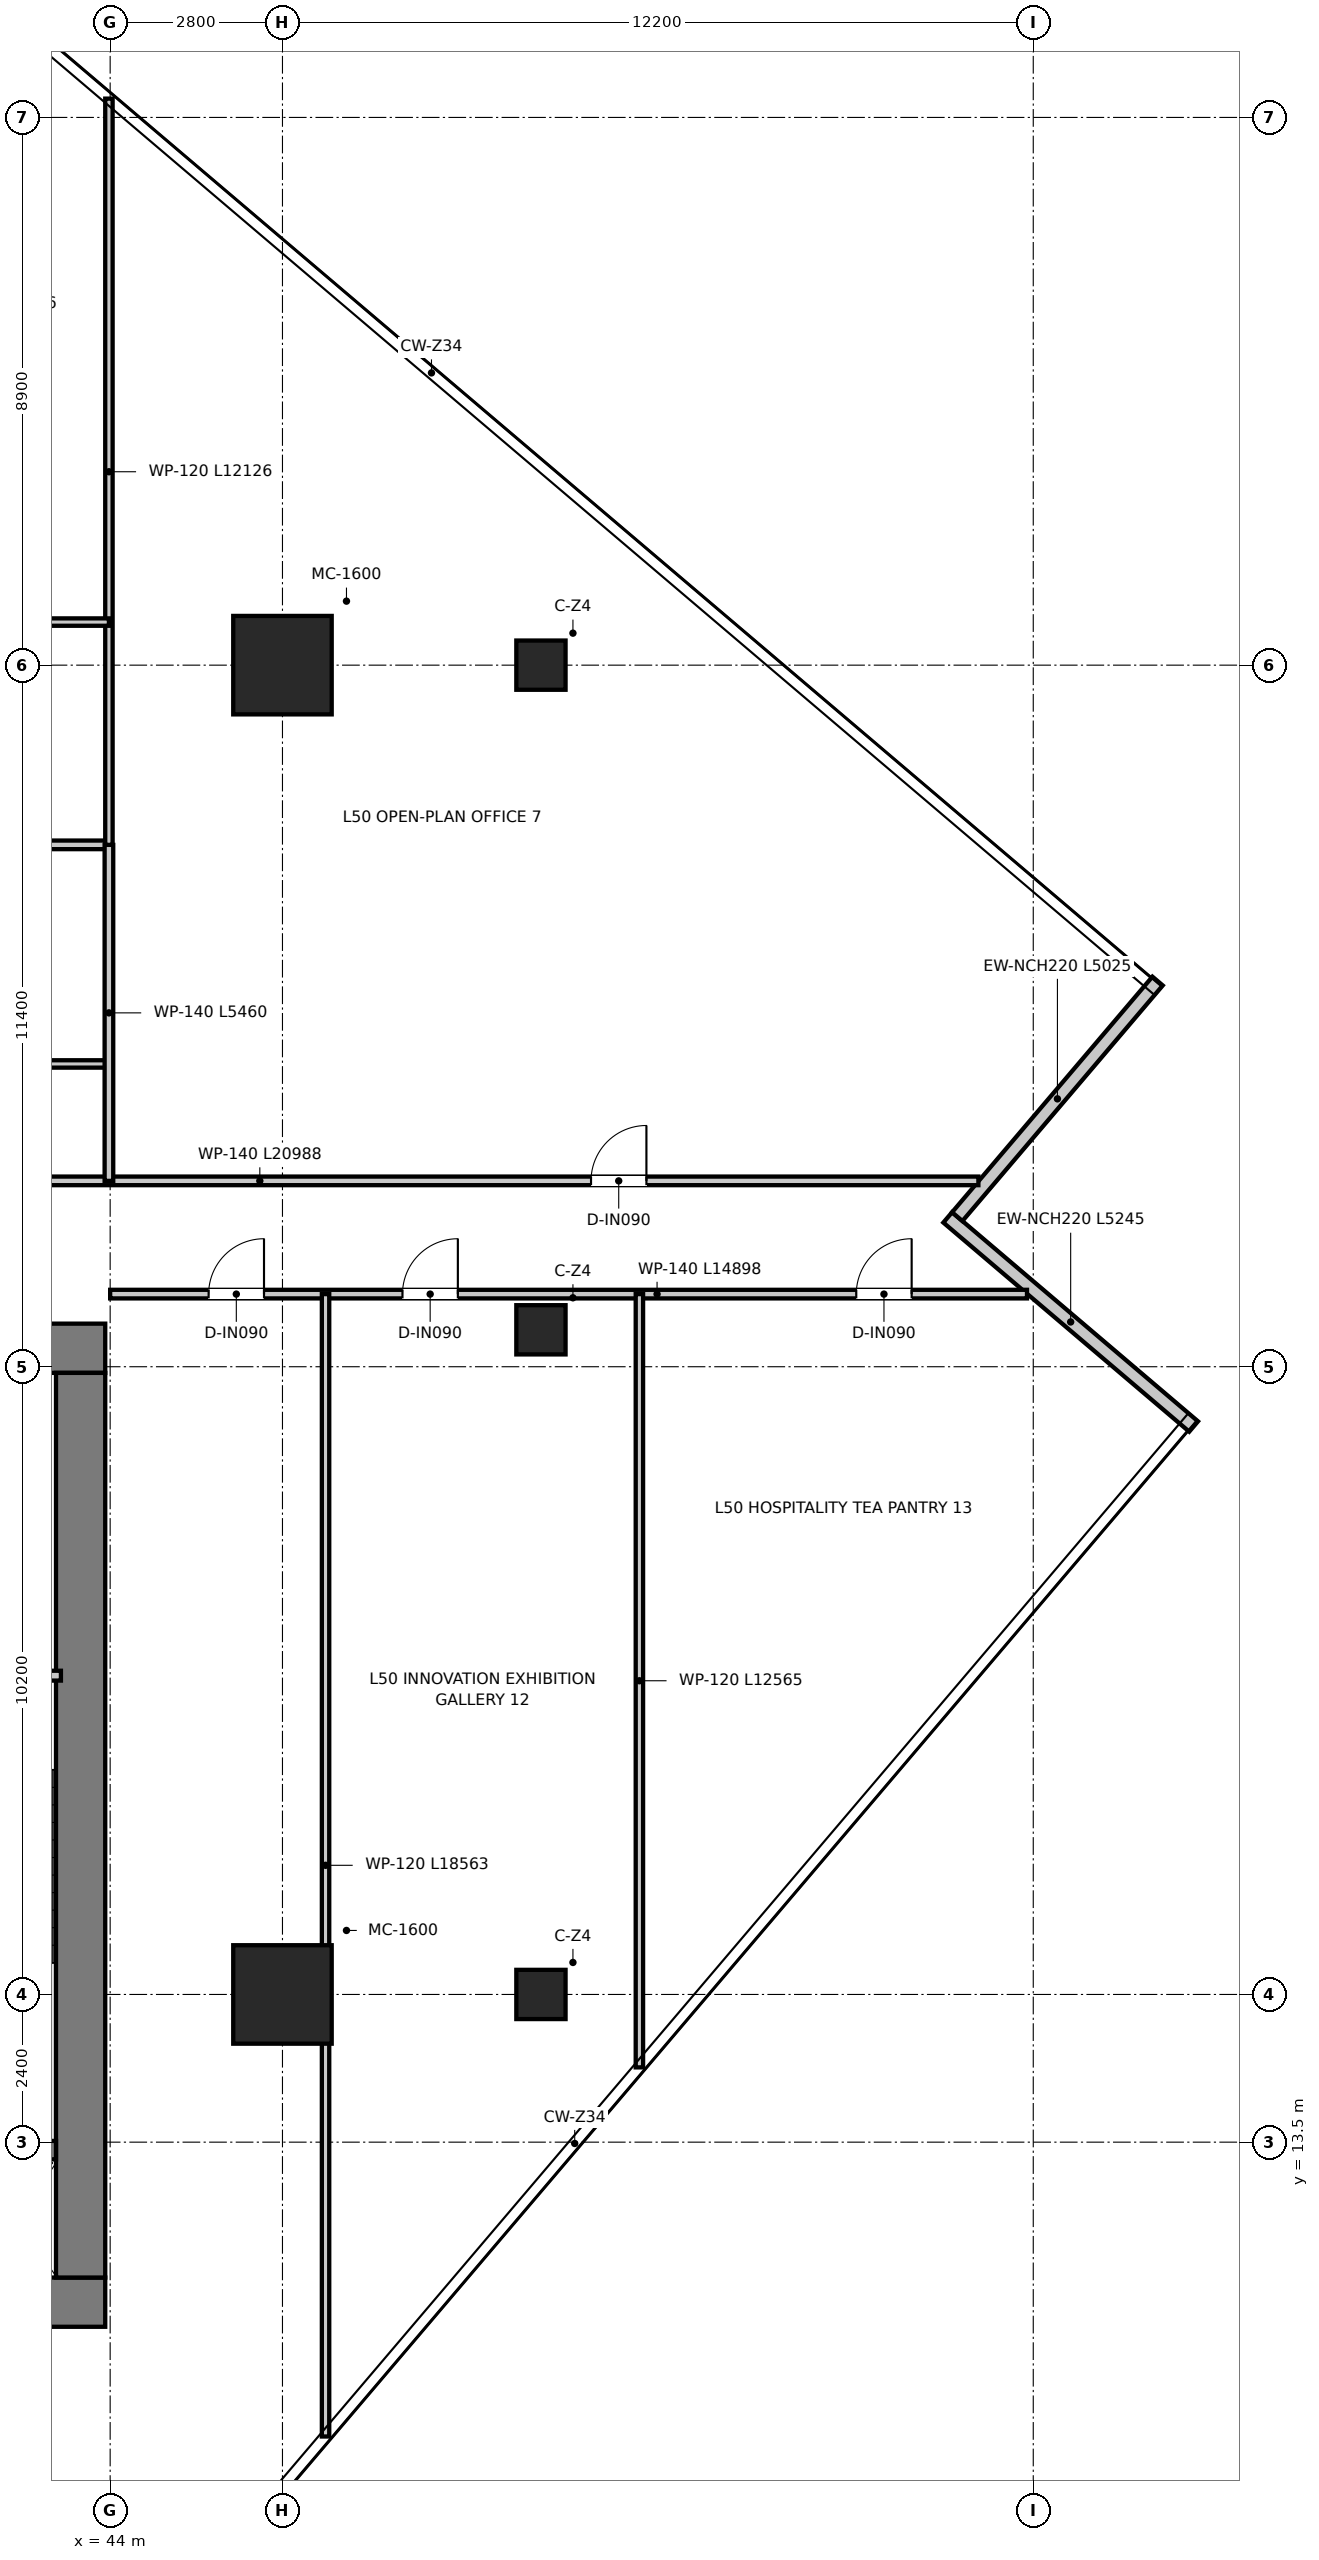
"""IFC4 building model, lengths in metres.
Left out: names, types, materials, properties, quantities, classifications, styles, units other than length and angle.
Written with IfcOpenShell. Run it as: python <this file> out.ifc"""

import sys

from ifc_helpers import new_model, si_unit, direction, frame, frame_2d, origin, origin_2d, place, context, subcontext, project, spatial, rectangle, extrude, source, transform, mapped, element, fill, save


model = new_model("IFC4")
c1 = context("Model", 3, precision=1e-05, world=origin(), true_north=direction((0.0, 1.0)))
c2 = subcontext(c1, "Body", "Model", "MODEL_VIEW")
j1 = project(units=[si_unit("LENGTHUNIT", "METRE"), si_unit("PLANEANGLEUNIT", "RADIAN")], contexts=[c1])
p1 = place(None, origin())
s1 = spatial("IfcSite", under=j1, at=p1, CompositionType="ELEMENT")
p2 = place(p1, origin())
s2 = spatial("IfcBuilding", under=s1, at=p2, CompositionType="ELEMENT")
p3 = place(p2, frame((0.0, 0.0, 207.3)))
s3 = spatial("IfcBuildingStorey", under=s2, at=p3, CompositionType="ELEMENT", Elevation=207.3)
p4 = place(p3, frame((28.08, 10.9, 0.0), z_axis=(0.0, 0.0, 1.0), x_axis=(1.0, 0.0, 0.0)))
e1 = element("IfcWall", 1, at=p4, inside=s3, PredefinedType="SHEAR", context=c2, shape_type="SweptSolid", body=[
    extrude(rectangle(XDim=15.84, YDim=0.8, at=frame_2d((7.92, 0.0))), origin(), (0.0, 0.0, 1.0), 3.95),
])
p5 = place(p3, frame((28.08, 26.4, 0.0), z_axis=(0.0, 0.0, 1.0), x_axis=(1.0, 0.0, 0.0)))
e2 = element("IfcWall", 2, at=p5, inside=s3, PredefinedType="SHEAR", context=c2, shape_type="SweptSolid", body=[
    extrude(rectangle(XDim=15.84, YDim=0.8, at=frame_2d((7.92, 0.0))), origin(), (0.0, 0.0, 1.0), 3.95),
])
p6 = place(p5, frame((7.22, 0.0, 0.0)))
e3 = element("IfcOpeningElement", 3, at=p6, cuts=e2, PredefinedType="OPENING", context=c2, shape_type="SweptSolid", body=[
    extrude(rectangle(XDim=1.4, YDim=2.2, at=frame_2d((0.7, 1.1))), frame((0.0, 0.41, 0.0), z_axis=(0.0, -1.0, 0.0), x_axis=(1.0, 0.0, 0.0)), (0.0, 0.0, 1.0), 0.82),
])
p7 = place(p5, frame((1.775, 0.0, 0.0)))
e4 = element("IfcOpeningElement", 4, at=p7, cuts=e2, PredefinedType="OPENING", context=c2, shape_type="SweptSolid", body=[
    extrude(rectangle(XDim=1.05, YDim=2.1, at=frame_2d((0.525, 1.05))), frame((0.0, 0.41, 0.0), z_axis=(0.0, -1.0, 0.0), x_axis=(1.0, 0.0, 0.0)), (0.0, 0.0, 1.0), 0.82),
])
p8 = place(p5, frame((13.015, 0.0, 0.0)))
e5 = element("IfcOpeningElement", 5, at=p8, cuts=e2, PredefinedType="OPENING", context=c2, shape_type="SweptSolid", body=[
    extrude(rectangle(XDim=1.05, YDim=2.1, at=frame_2d((0.525, 1.05))), frame((0.0, 0.41, 0.0), z_axis=(0.0, -1.0, 0.0), x_axis=(1.0, 0.0, 0.0)), (0.0, 0.0, 1.0), 0.82),
])
p9 = place(p3, frame((43.52, 11.3, 0.0), z_axis=(0.0, 0.0, 1.0), x_axis=(0.0, 1.0, 0.0)))
e6 = element("IfcWall", 6, at=p9, inside=s3, PredefinedType="SHEAR", context=c2, shape_type="SweptSolid", body=[
    extrude(rectangle(XDim=14.7, YDim=0.8, at=frame_2d((7.35, 0.0))), origin(), (0.0, 0.0, 1.0), 3.95),
])
p10 = place(p3, frame((40.02, 13.37, 0.0), z_axis=(0.0, 0.0, 1.0), x_axis=(1.0, 0.0, 0.0)))
e7 = element("IfcWall", 7, at=p10, inside=s3, PredefinedType="SHEAR", context=c2, shape_type="SweptSolid", body=[
    extrude(rectangle(XDim=3.1, YDim=0.3, at=frame_2d((1.55, 0.0))), origin(), (0.0, 0.0, 1.0), 3.95),
])
m1 = source(origin(), c2, "Body", "SweptSolid", [
    extrude(rectangle(XDim=1.6, YDim=1.6, at=origin_2d()), origin(), (0.0, 0.0, 1.0), 3.95),
])
for number, where, z_axis, x_axis in (
    (8, (46.8, 15.9, 0.0), (0.0, 0.0, 1.0), (1.0, 0.0, 0.0)),
    (9, (46.8, 37.5, 0.0), (0.0, 0.0, 1.0), (1.0, 0.0, 0.0)),
):
    element("IfcColumn", number, at=place(p3, frame(where, z_axis=z_axis, x_axis=x_axis)), inside=s3, PredefinedType="USERDEFINED", context=c2, shape_type="MappedRepresentation", body=[
        mapped(m1, transform((0.0, 0.0, 0.0), x_axis=(1.0, 0.0, 0.0), y_axis=(0.0, 1.0, 0.0), z_axis=(0.0, 0.0, 1.0), scale=1.0)),
    ])
m2 = source(origin(), c2, "Body", "SweptSolid", [
    extrude(rectangle(XDim=0.8, YDim=0.8, at=origin_2d()), origin(), (0.0, 0.0, 1.0), 3.95),
])
for number, where, z_axis, x_axis in (
    (10, (51.0, 37.5, 0.0), (0.0, 0.0, 1.0), (1.0, 0.0, 0.0)),
    (11, (51.0, 26.7, 0.0), (0.0, 0.0, 1.0), (1.0, 0.0, 0.0)),
    (12, (51.0, 15.9, 0.0), (0.0, 0.0, 1.0), (1.0, 0.0, 0.0)),
):
    element("IfcColumn", number, at=place(p3, frame(where, z_axis=z_axis, x_axis=x_axis)), inside=s3, PredefinedType="COLUMN", context=c2, shape_type="MappedRepresentation", body=[
        mapped(m2, transform((0.0, 0.0, 0.0), x_axis=(1.0, 0.0, 0.0), y_axis=(0.0, 1.0, 0.0), z_axis=(0.0, 0.0, 1.0), scale=1.0)),
    ])
p11 = place(p3, frame((61.606, 25.129, 0.0), z_axis=(0.0, 0.0, 1.0), x_axis=(-0.761826750047, 0.647780829381, 0.0)))
e13 = element("IfcWall", 13, at=p11, inside=s3, PredefinedType="ELEMENTEDWALL", context=c2, shape_type="SweptSolid", body=[
    extrude(rectangle(XDim=5.245, YDim=0.22, at=frame_2d((2.623, 0.0))), origin(), (0.0, 0.0, 1.0), 3.67),
])
p12 = place(p3, frame((57.765, 28.539, 0.0), z_axis=(0.0, 0.0, 1.0), x_axis=(0.647789440707, 0.761819427757, 0.0)))
e14 = element("IfcWall", 14, at=p12, inside=s3, PredefinedType="ELEMENTEDWALL", context=c2, shape_type="SweptSolid", body=[
    extrude(rectangle(XDim=5.025, YDim=0.22, at=frame_2d((2.512, 0.0))), origin(), (0.0, 0.0, 1.0), 3.67),
])
p13 = place(p3, frame((40.04, 21.08, 0.0), z_axis=(0.0, 0.0, 1.0), x_axis=(1.0, 0.0, 0.0)))
e15 = element("IfcWall", 15, at=p13, inside=s3, PredefinedType="PARTITIONING", context=c2, shape_type="SweptSolid", body=[
    extrude(rectangle(XDim=3.16, YDim=0.16, at=frame_2d((1.58, 0.0))), origin(), (0.0, 0.0, 1.0), 3.67),
])
p14 = place(p13, frame((1.055, 0.0, 0.0)))
e16 = element("IfcOpeningElement", 16, at=p14, cuts=e15, PredefinedType="OPENING", context=c2, shape_type="SweptSolid", body=[
    extrude(rectangle(XDim=1.05, YDim=2.1, at=frame_2d((0.525, 1.05))), frame((0.0, 0.09, 0.0), z_axis=(0.0, -1.0, 0.0), x_axis=(1.0, 0.0, 0.0)), (0.0, 0.0, 1.0), 0.18),
])
p15 = place(p3, frame((37.12, 29.12, 0.0), z_axis=(0.0, 0.0, 1.0), x_axis=(1.0, 0.0, 0.0)))
e17 = element("IfcWall", 17, at=p15, inside=s3, PredefinedType="PARTITIONING", context=c2, shape_type="SweptSolid", body=[
    extrude(rectangle(XDim=20.988, YDim=0.14, at=frame_2d((10.494, 0.0))), origin(), (0.0, 0.0, 1.0), 3.03),
])
p16 = place(p15, frame((3.03, 0.0, 0.0)))
e18 = element("IfcOpeningElement", 18, at=p16, cuts=e17, PredefinedType="OPENING", context=c2, shape_type="SweptSolid", body=[
    extrude(rectangle(XDim=0.9, YDim=2.1, at=frame_2d((0.45, 1.05))), frame((0.0, 0.08, 0.0), z_axis=(0.0, -1.0, 0.0), x_axis=(1.0, 0.0, 0.0)), (0.0, 0.0, 1.0), 0.16),
])
p17 = place(p15, frame((14.694, 0.0, 0.0)))
e19 = element("IfcOpeningElement", 19, at=p17, cuts=e17, PredefinedType="OPENING", context=c2, shape_type="SweptSolid", body=[
    extrude(rectangle(XDim=0.9, YDim=2.1, at=frame_2d((0.45, 1.05))), frame((0.0, 0.08, 0.0), z_axis=(0.0, -1.0, 0.0), x_axis=(1.0, 0.0, 0.0)), (0.0, 0.0, 1.0), 0.16),
])
p18 = place(p3, frame((44.0, 27.28, 0.0), z_axis=(0.0, 0.0, 1.0), x_axis=(1.0, 0.0, 0.0)))
e20 = element("IfcWall", 20, at=p18, inside=s3, PredefinedType="PARTITIONING", context=c2, shape_type="SweptSolid", body=[
    extrude(rectangle(XDim=14.898, YDim=0.14, at=frame_2d((7.449, 0.0))), origin(), (0.0, 0.0, 1.0), 3.03),
])
p19 = place(p18, frame((1.6, 0.0, 0.0)))
e21 = element("IfcOpeningElement", 21, at=p19, cuts=e20, PredefinedType="OPENING", context=c2, shape_type="SweptSolid", body=[
    extrude(rectangle(XDim=0.9, YDim=2.1, at=frame_2d((0.45, 1.05))), frame((0.0, 0.08, 0.0), z_axis=(0.0, -1.0, 0.0), x_axis=(1.0, 0.0, 0.0)), (0.0, 0.0, 1.0), 0.16),
])
p20 = place(p18, frame((4.75, 0.0, 0.0)))
e22 = element("IfcOpeningElement", 22, at=p20, cuts=e20, PredefinedType="OPENING", context=c2, shape_type="SweptSolid", body=[
    extrude(rectangle(XDim=0.9, YDim=2.1, at=frame_2d((0.45, 1.05))), frame((0.0, 0.08, 0.0), z_axis=(0.0, -1.0, 0.0), x_axis=(1.0, 0.0, 0.0)), (0.0, 0.0, 1.0), 0.16),
])
p21 = place(p18, frame((12.124, 0.0, 0.0)))
e23 = element("IfcOpeningElement", 23, at=p21, cuts=e20, PredefinedType="OPENING", context=c2, shape_type="SweptSolid", body=[
    extrude(rectangle(XDim=0.9, YDim=2.1, at=frame_2d((0.45, 1.05))), frame((0.0, 0.08, 0.0), z_axis=(0.0, -1.0, 0.0), x_axis=(1.0, 0.0, 0.0)), (0.0, 0.0, 1.0), 0.16),
])
p22 = place(p3, frame((37.12, 31.02, 0.0), z_axis=(0.0, 0.0, 1.0), x_axis=(1.0, 0.0, 0.0)))
e24 = element("IfcWall", 24, at=p22, inside=s3, PredefinedType="PARTITIONING", context=c2, shape_type="SweptSolid", body=[
    extrude(rectangle(XDim=6.86, YDim=0.12, at=frame_2d((3.43, 0.0))), origin(), (0.0, 0.0, 1.0), 3.18),
])
p23 = place(p3, frame((37.12, 34.58, 0.0), z_axis=(0.0, 0.0, 1.0), x_axis=(1.0, 0.0, 0.0)))
e25 = element("IfcWall", 25, at=p23, inside=s3, PredefinedType="PARTITIONING", context=c2, shape_type="SweptSolid", body=[
    extrude(rectangle(XDim=6.86, YDim=0.14, at=frame_2d((3.43, 0.0))), origin(), (0.0, 0.0, 1.0), 3.18),
])
p24 = place(p3, frame((43.98, 29.12, 0.0), z_axis=(0.0, 0.0, 1.0), x_axis=(0.0, 1.0, 0.0)))
e26 = element("IfcWall", 26, at=p24, inside=s3, PredefinedType="PARTITIONING", context=c2, shape_type="SweptSolid", body=[
    extrude(rectangle(XDim=5.46, YDim=0.14, at=frame_2d((2.73, 0.0))), origin(), (0.0, 0.0, 1.0), 3.37),
])
p25 = place(p3, frame((43.98, 34.58, 0.0), z_axis=(0.0, 0.0, 1.0), x_axis=(0.0, 1.0, 0.0)))
e27 = element("IfcWall", 27, at=p25, inside=s3, PredefinedType="PARTITIONING", context=c2, shape_type="SweptSolid", body=[
    extrude(rectangle(XDim=12.125, YDim=0.12, at=frame_2d((6.063, 0.0))), origin(), (0.0, 0.0, 1.0), 3.03),
])
p26 = place(p3, frame((37.12, 38.2, 0.0), z_axis=(0.0, 0.0, 1.0), x_axis=(1.0, 0.0, 0.0)))
e28 = element("IfcWall", 28, at=p26, inside=s3, PredefinedType="PARTITIONING", context=c2, shape_type="SweptSolid", body=[
    extrude(rectangle(XDim=6.86, YDim=0.12, at=frame_2d((3.43, 0.0))), origin(), (0.0, 0.0, 1.0), 3.18),
])
p27 = place(p3, frame((47.5, 8.717, 0.0), z_axis=(0.0, 0.0, 1.0), x_axis=(0.0, 1.0, 0.0)))
e29 = element("IfcWall", 29, at=p27, inside=s3, PredefinedType="PARTITIONING", context=c2, shape_type="SweptSolid", body=[
    extrude(rectangle(XDim=18.563, YDim=0.12, at=frame_2d((9.281, 0.0))), origin(), (0.0, 0.0, 1.0), 3.18),
])
p28 = place(p3, frame((52.6, 14.715, 0.0), z_axis=(0.0, 0.0, 1.0), x_axis=(0.0, 1.0, 0.0)))
e30 = element("IfcWall", 30, at=p28, inside=s3, PredefinedType="PARTITIONING", context=c2, shape_type="SweptSolid", body=[
    extrude(rectangle(XDim=12.565, YDim=0.12, at=frame_2d((6.283, 0.0))), origin(), (0.0, 0.0, 1.0), 3.67),
])
p29 = place(p17, origin())
e31 = element("IfcDoor", 31, at=p29, inside=s3, OperationType="SINGLE_SWING_RIGHT", PredefinedType="DOOR", context=c2, shape_type="SweptSolid", body=[
    extrude(rectangle(XDim=0.9, YDim=2.1, at=frame_2d((0.45, 1.05))), frame((0.0, 0.025, 0.0), z_axis=(0.0, -1.0, 0.0), x_axis=(1.0, 0.0, 0.0)), (0.0, 0.0, 1.0), 0.05),
])
fill(e19, e31)
p30 = place(p19, origin())
e32 = element("IfcDoor", 32, at=p30, inside=s3, OperationType="SINGLE_SWING_RIGHT", PredefinedType="DOOR", context=c2, shape_type="SweptSolid", body=[
    extrude(rectangle(XDim=0.9, YDim=2.1, at=frame_2d((0.45, 1.05))), frame((0.0, 0.025, 0.0), z_axis=(0.0, -1.0, 0.0), x_axis=(1.0, 0.0, 0.0)), (0.0, 0.0, 1.0), 0.05),
])
fill(e21, e32)
p31 = place(p20, origin())
e33 = element("IfcDoor", 33, at=p31, inside=s3, OperationType="SINGLE_SWING_RIGHT", PredefinedType="DOOR", context=c2, shape_type="SweptSolid", body=[
    extrude(rectangle(XDim=0.9, YDim=2.1, at=frame_2d((0.45, 1.05))), frame((0.0, 0.025, 0.0), z_axis=(0.0, -1.0, 0.0), x_axis=(1.0, 0.0, 0.0)), (0.0, 0.0, 1.0), 0.05),
])
fill(e22, e33)
p32 = place(p21, origin())
e34 = element("IfcDoor", 34, at=p32, inside=s3, OperationType="SINGLE_SWING_RIGHT", PredefinedType="DOOR", context=c2, shape_type="SweptSolid", body=[
    extrude(rectangle(XDim=0.9, YDim=2.1, at=frame_2d((0.45, 1.05))), frame((0.0, 0.025, 0.0), z_axis=(0.0, -1.0, 0.0), x_axis=(1.0, 0.0, 0.0)), (0.0, 0.0, 1.0), 0.05),
])
fill(e23, e34)
save(model, sys.argv[1])
